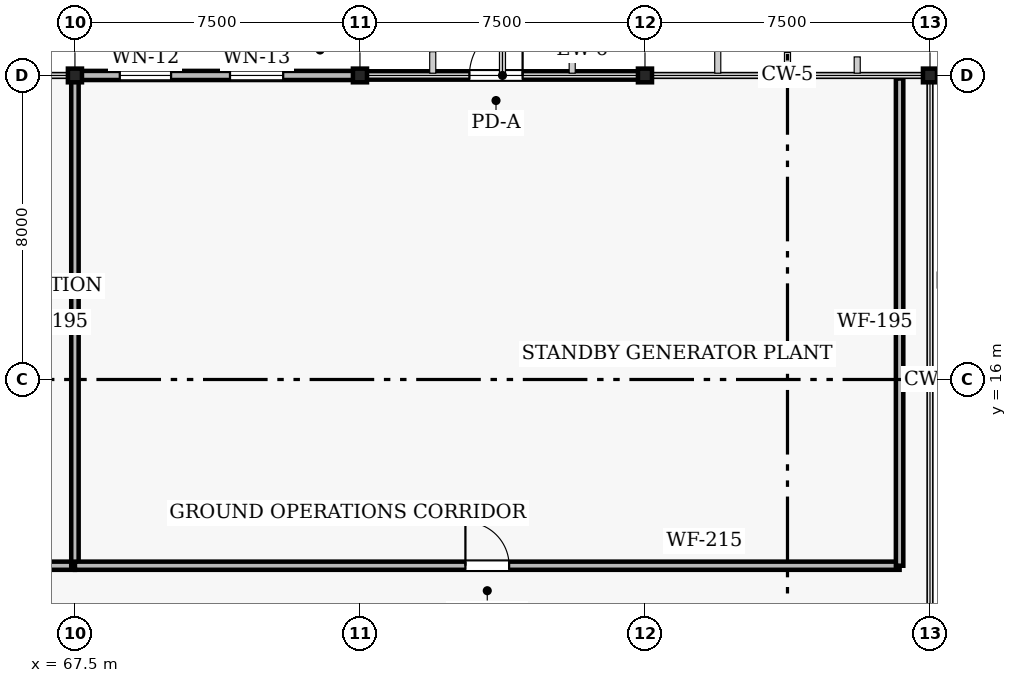
"""IFC4 building model, lengths in metres.
Left out: names, types, materials, properties, quantities, classifications, styles, units other than length and angle.
Written with IfcOpenShell. Run it as: python <this file> out.ifc"""

import sys

from ifc_helpers import new_model, si_unit, direction, frame, frame_2d, origin, origin_2d, place, context, subcontext, project, spatial, rectangle, i_section, extrude, element, fill, save


model = new_model("IFC4")
c1 = context("Model", 3, precision=1e-05, world=origin(), true_north=direction((0.0, 1.0)))
c2 = subcontext(c1, "Body", "Model", "MODEL_VIEW")
j1 = project(units=[si_unit("LENGTHUNIT", "METRE"), si_unit("PLANEANGLEUNIT", "RADIAN")], contexts=[c1])
p1 = place(None, origin())
s1 = spatial("IfcSite", under=j1, at=p1, CompositionType="ELEMENT")
p2 = place(p1, origin())
s2 = spatial("IfcBuilding", under=s1, at=p2, CompositionType="ELEMENT")
p3 = place(p2, origin())
s3 = spatial("IfcBuildingStorey", under=s2, at=p3, CompositionType="ELEMENT", Elevation=0.0)
for number, where, z_axis, x_axis in (
    (1, (67.5, 24.0, 0.0), (0.0, 0.0, 1.0), (1.0, 0.0, 0.0)),
    (2, (75.0, 24.0, 0.0), (0.0, 0.0, 1.0), (1.0, 0.0, 0.0)),
    (3, (82.5, 24.0, 0.0), (0.0, 0.0, 1.0), (1.0, 0.0, 0.0)),
    (4, (90.0, 24.0, 0.0), (0.0, 0.0, 1.0), (1.0, 0.0, 0.0)),
):
    element("IfcColumn", number, at=place(p3, frame(where, z_axis=z_axis, x_axis=x_axis)), inside=s3, PredefinedType="COLUMN", context=c2, shape_type="SweptSolid", body=[
        extrude(i_section(OverallWidth=0.37, OverallDepth=0.36, WebThickness=0.012, FlangeThickness=0.02, FilletRadius=0.015, at=origin_2d()), origin(), (0.0, 0.0, 1.0), 4.5),
    ])
p4 = place(p3, frame((67.58, 24.0, 0.0), z_axis=(0.0, 0.0, 1.0), x_axis=(1.0, 0.0, 0.0)))
e5 = element("IfcWall", 5, at=p4, inside=s3, PredefinedType="SOLIDWALL", context=c2, shape_type="SweptSolid", body=[
    extrude(rectangle(XDim=7.34, YDim=0.24, at=frame_2d((3.67, 0.0))), origin(), (0.0, 0.0, 1.0), 3.8),
])
p5 = place(p4, frame((1.1, 0.0, 1.05)))
e6 = element("IfcOpeningElement", 6, at=p5, cuts=e5, PredefinedType="OPENING", context=c2, shape_type="SweptSolid", body=[
    extrude(rectangle(XDim=1.35, YDim=1.5, at=frame_2d((0.675, 0.75))), frame((0.0, 0.13, 0.0), z_axis=(0.0, -1.0, 0.0), x_axis=(1.0, 0.0, 0.0)), (0.0, 0.0, 1.0), 0.26),
])
p6 = place(p4, frame((4.0, 0.0, 1.05)))
e7 = element("IfcOpeningElement", 7, at=p6, cuts=e5, PredefinedType="OPENING", context=c2, shape_type="SweptSolid", body=[
    extrude(rectangle(XDim=1.4, YDim=1.6, at=frame_2d((0.7, 0.8))), frame((0.0, 0.13, 0.0), z_axis=(0.0, -1.0, 0.0), x_axis=(1.0, 0.0, 0.0)), (0.0, 0.0, 1.0), 0.26),
])
p7 = place(p3, frame((75.08, 24.0, 0.0), z_axis=(0.0, 0.0, 1.0), x_axis=(1.0, 0.0, 0.0)))
e8 = element("IfcWall", 8, at=p7, inside=s3, PredefinedType="SOLIDWALL", context=c2, shape_type="SweptSolid", body=[
    extrude(rectangle(XDim=7.34, YDim=0.22, at=frame_2d((3.67, 0.0))), origin(), (0.0, 0.0, 1.0), 3.75),
])
p8 = place(p7, frame((2.8, 0.0, 0.0)))
e9 = element("IfcOpeningElement", 9, at=p8, cuts=e8, PredefinedType="OPENING", context=c2, shape_type="SweptSolid", body=[
    extrude(rectangle(XDim=1.4, YDim=2.2, at=frame_2d((0.7, 1.1))), frame((0.0, 0.12, 0.0), z_axis=(0.0, -1.0, 0.0), x_axis=(1.0, 0.0, 0.0)), (0.0, 0.0, 1.0), 0.24),
])
p9 = place(p3, frame((36.5, 11.1, 0.0), z_axis=(0.0, 0.0, 1.0), x_axis=(1.0, 0.0, 0.0)))
e10 = element("IfcWall", 10, at=p9, inside=s3, PredefinedType="PARTITIONING", context=c2, shape_type="SweptSolid", body=[
    extrude(rectangle(XDim=31.0, YDim=0.215, at=frame_2d((15.5, 0.0))), origin(), (0.0, 0.0, 1.0), 3.7),
])
p10 = place(p9, frame((11.343, 0.0, 0.0)))
e11 = element("IfcOpeningElement", 11, at=p10, cuts=e10, PredefinedType="OPENING", context=c2, shape_type="SweptSolid", body=[
    extrude(rectangle(XDim=1.15, YDim=2.15, at=frame_2d((0.575, 1.075))), frame((0.0, 0.117, 0.0), z_axis=(0.0, -1.0, 0.0), x_axis=(1.0, 0.0, 0.0)), (0.0, 0.0, 1.0), 0.235),
])
p11 = place(p3, frame((67.5, 11.1, 0.0), z_axis=(0.0, 0.0, 1.0), x_axis=(0.0, 1.0, 0.0)))
e12 = element("IfcWall", 12, at=p11, inside=s3, PredefinedType="PARTITIONING", context=c2, shape_type="SweptSolid", body=[
    extrude(rectangle(XDim=12.82, YDim=0.195, at=frame_2d((6.41, 0.0))), origin(), (0.0, 0.0, 1.0), 3.581),
])
p12 = place(p3, frame((67.5, 11.1, 0.0), z_axis=(0.0, 0.0, 1.0), x_axis=(1.0, 0.0, 0.0)))
e13 = element("IfcWall", 13, at=p12, inside=s3, PredefinedType="PARTITIONING", context=c2, shape_type="SweptSolid", body=[
    extrude(rectangle(XDim=21.7, YDim=0.215, at=frame_2d((10.85, 0.0))), origin(), (0.0, 0.0, 1.0), 3.7),
])
p13 = place(p12, frame((10.275, 0.0, 0.0)))
e14 = element("IfcOpeningElement", 14, at=p13, cuts=e13, PredefinedType="OPENING", context=c2, shape_type="SweptSolid", body=[
    extrude(rectangle(XDim=1.15, YDim=2.15, at=frame_2d((0.575, 1.075))), frame((0.0, 0.117, 0.0), z_axis=(0.0, -1.0, 0.0), x_axis=(1.0, 0.0, 0.0)), (0.0, 0.0, 1.0), 0.235),
])
p14 = place(p3, frame((89.2, 11.1, 0.0), z_axis=(0.0, 0.0, 1.0), x_axis=(0.0, 1.0, 0.0)))
e15 = element("IfcWall", 15, at=p14, inside=s3, PredefinedType="PARTITIONING", context=c2, shape_type="SweptSolid", body=[
    extrude(rectangle(XDim=12.82, YDim=0.195, at=frame_2d((6.41, 0.0))), origin(), (0.0, 0.0, 1.0), 3.7),
])
p15 = place(p5, origin())
e16 = element("IfcWindow", 16, at=p15, inside=s3, PartitioningType="SINGLE_PANEL", PredefinedType="WINDOW", context=c2, shape_type="SweptSolid", body=[
    extrude(rectangle(XDim=1.35, YDim=1.5, at=frame_2d((0.675, 0.75))), frame((0.0, 0.03, 0.0), z_axis=(0.0, -1.0, 0.0), x_axis=(1.0, 0.0, 0.0)), (0.0, 0.0, 1.0), 0.06),
])
fill(e6, e16)
p16 = place(p6, origin())
e17 = element("IfcWindow", 17, at=p16, inside=s3, PartitioningType="SINGLE_PANEL", PredefinedType="WINDOW", context=c2, shape_type="SweptSolid", body=[
    extrude(rectangle(XDim=1.4, YDim=1.6, at=frame_2d((0.7, 0.8))), frame((0.0, 0.03, 0.0), z_axis=(0.0, -1.0, 0.0), x_axis=(1.0, 0.0, 0.0)), (0.0, 0.0, 1.0), 0.06),
])
fill(e7, e17)
p17 = place(p8, origin())
e18 = element("IfcDoor", 18, at=p17, inside=s3, OperationType="SINGLE_SWING_RIGHT", PredefinedType="DOOR", context=c2, shape_type="SweptSolid", body=[
    extrude(rectangle(XDim=1.4, YDim=2.2, at=frame_2d((0.7, 1.1))), frame((0.0, 0.025, 0.0), z_axis=(0.0, -1.0, 0.0), x_axis=(1.0, 0.0, 0.0)), (0.0, 0.0, 1.0), 0.05),
])
fill(e9, e18)
p18 = place(p13, origin())
e19 = element("IfcDoor", 19, at=p18, inside=s3, OperationType="SINGLE_SWING_LEFT", PredefinedType="DOOR", context=c2, shape_type="SweptSolid", body=[
    extrude(rectangle(XDim=1.15, YDim=2.15, at=frame_2d((0.575, 1.075))), frame((0.0, 0.025, 0.0), z_axis=(0.0, -1.0, 0.0), x_axis=(1.0, 0.0, 0.0)), (0.0, 0.0, 1.0), 0.05),
])
fill(e14, e19)
save(model, sys.argv[1])
